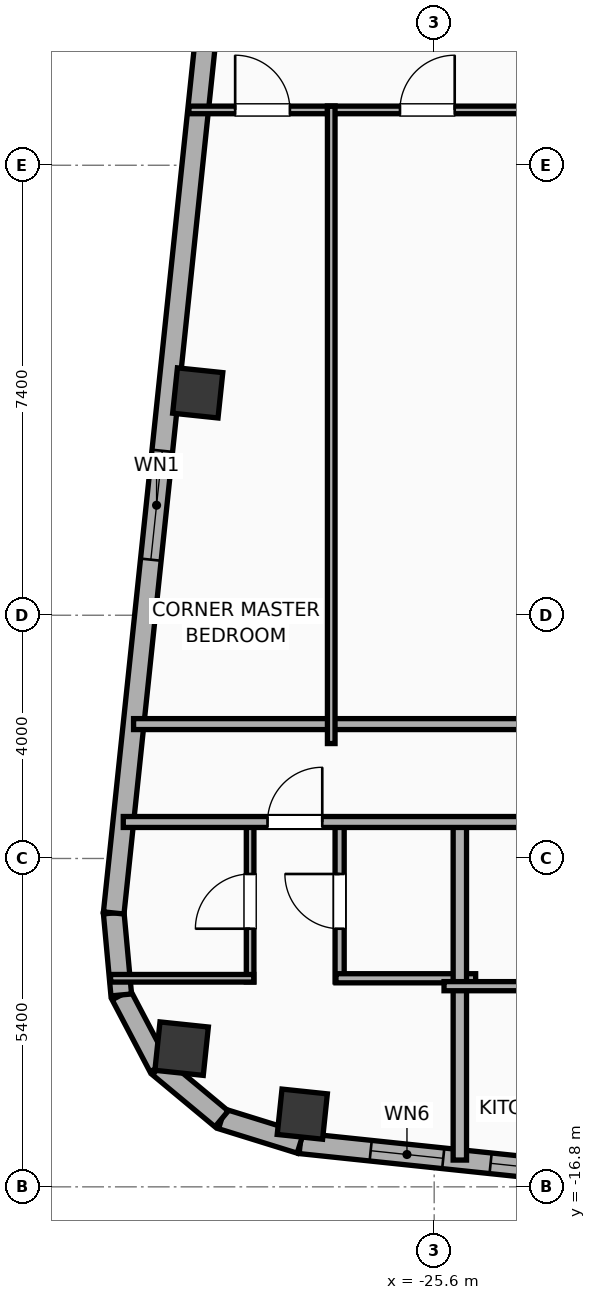
"""IFC4 building model, lengths in metres.
Left out: names, types, materials, properties, quantities, classifications, styles, units other than length and angle.
Written with IfcOpenShell. Run it as: python <this file> out.ifc"""

import sys

from ifc_helpers import new_model, si_unit, direction, frame, frame_2d, origin, origin_2d, place, context, subcontext, project, spatial, rectangle, hollow_rectangle, hollow_circle, extrude, element, fill, save


model = new_model("IFC4")
c1 = context("Model", 3, precision=1e-05, world=origin(), true_north=direction((0.0, 1.0)))
c2 = subcontext(c1, "Body", "Model", "MODEL_VIEW")
j1 = project(units=[si_unit("LENGTHUNIT", "METRE"), si_unit("PLANEANGLEUNIT", "RADIAN")], contexts=[c1])
p1 = place(None, origin())
s1 = spatial("IfcSite", under=j1, at=p1, CompositionType="ELEMENT")
p2 = place(p1, origin())
s2 = spatial("IfcBuilding", under=s1, at=p2, CompositionType="ELEMENT")
p3 = place(p2, frame((0.0, 0.0, 279.5)))
s3 = spatial("IfcBuildingStorey", under=s2, at=p3, CompositionType="ELEMENT", Elevation=279.5)
for number, where, z_axis, x_axis in (
    (1, (-27.769, -15.604, 0.0), (0.0, 0.0, 1.0), (0.995, -0.105, 0.0)),
    (2, (-29.489, -3.744, 0.0), (0.0, 0.0, 1.0), (0.995, -0.105, 0.0)),
):
    element("IfcColumn", number, at=place(p3, frame(where, z_axis=z_axis, x_axis=x_axis)), inside=s3, PredefinedType="COLUMN", context=c2, shape_type="SweptSolid", body=[
        extrude(hollow_rectangle(XDim=0.75, YDim=0.75, WallThickness=0.025, at=origin_2d()), origin(), (0.0, 0.0, 1.0), 3.9),
    ])
p4 = place(p3, frame((-29.753, -14.527, 0.0), z_axis=(0.0, 0.0, 1.0), x_axis=(0.994521895368, -0.104528463268, 0.0)))
e3 = element("IfcColumn", 3, at=p4, inside=s3, PredefinedType="COLUMN", context=c2, shape_type="SweptSolid", body=[
    extrude(hollow_circle(Radius=0.4, WallThickness=0.028, at=origin_2d()), origin(), (0.0, 0.0, 1.0), 3.9),
])
p5 = place(p3, frame((18.708, -20.972, 0.0), z_axis=(0.0, 0.0, 1.0), x_axis=(-0.994521888554, 0.104528528102, 0.0)))
e4 = element("IfcWall", 4, at=p5, inside=s3, PredefinedType="ELEMENTEDWALL", context=c2, shape_type="SweptSolid", body=[
    extrude(rectangle(XDim=46.766, YDim=0.34, at=frame_2d((23.383, 0.0))), origin(), (0.0, 0.0, 1.0), 3.65),
])
p6 = place(p5, frame((23.833, 0.0, 0.75)))
e5 = element("IfcOpeningElement", 5, at=p6, cuts=e4, PredefinedType="OPENING", context=c2, shape_type="SweptSolid", body=[
    extrude(rectangle(XDim=2.4, YDim=2.1, at=frame_2d((1.2, 1.05))), frame((0.0, 0.18, 0.0), z_axis=(0.0, -1.0, 0.0), x_axis=(1.0, 0.0, 0.0)), (0.0, 0.0, 1.0), 0.36),
])
p7 = place(p5, frame((38.622, 0.0, 0.75)))
e6 = element("IfcOpeningElement", 6, at=p7, cuts=e4, PredefinedType="OPENING", context=c2, shape_type="SweptSolid", body=[
    extrude(rectangle(XDim=2.4, YDim=2.1, at=frame_2d((1.2, 1.05))), frame((0.0, 0.18, 0.0), z_axis=(0.0, -1.0, 0.0), x_axis=(1.0, 0.0, 0.0)), (0.0, 0.0, 1.0), 0.36),
])
p8 = place(p5, frame((44.402, 0.0, 0.75)))
e7 = element("IfcOpeningElement", 7, at=p8, cuts=e4, PredefinedType="OPENING", context=c2, shape_type="SweptSolid", body=[
    extrude(rectangle(XDim=1.2, YDim=2.05, at=frame_2d((0.6, 1.025))), frame((0.0, 0.18, 0.0), z_axis=(0.0, -1.0, 0.0), x_axis=(1.0, 0.0, 0.0)), (0.0, 0.0, 1.0), 0.36),
])
p9 = place(p5, frame((42.419, 0.0, 0.75)))
e8 = element("IfcOpeningElement", 8, at=p9, cuts=e4, PredefinedType="OPENING", context=c2, shape_type="SweptSolid", body=[
    extrude(rectangle(XDim=1.2, YDim=2.05, at=frame_2d((0.6, 1.025))), frame((0.0, 0.18, 0.0), z_axis=(0.0, -1.0, 0.0), x_axis=(1.0, 0.0, 0.0)), (0.0, 0.0, 1.0), 0.36),
])
p10 = place(p5, frame((34.933, 0.0, 0.75)))
e9 = element("IfcOpeningElement", 9, at=p10, cuts=e4, PredefinedType="OPENING", context=c2, shape_type="SweptSolid", body=[
    extrude(rectangle(XDim=1.2, YDim=2.05, at=frame_2d((0.6, 1.025))), frame((0.0, 0.18, 0.0), z_axis=(0.0, -1.0, 0.0), x_axis=(1.0, 0.0, 0.0)), (0.0, 0.0, 1.0), 0.36),
])
p11 = place(p5, frame((28.692, 0.0, 0.75)))
e10 = element("IfcOpeningElement", 10, at=p11, cuts=e4, PredefinedType="OPENING", context=c2, shape_type="SweptSolid", body=[
    extrude(rectangle(XDim=1.2, YDim=2.05, at=frame_2d((0.6, 1.025))), frame((0.0, 0.18, 0.0), z_axis=(0.0, -1.0, 0.0), x_axis=(1.0, 0.0, 0.0)), (0.0, 0.0, 1.0), 0.36),
])
p12 = place(p5, frame((30.957, 0.0, 0.75)))
e11 = element("IfcOpeningElement", 11, at=p12, cuts=e4, PredefinedType="OPENING", context=c2, shape_type="SweptSolid", body=[
    extrude(rectangle(XDim=1.2, YDim=2.05, at=frame_2d((0.6, 1.025))), frame((0.0, 0.18, 0.0), z_axis=(0.0, -1.0, 0.0), x_axis=(1.0, 0.0, 0.0)), (0.0, 0.0, 1.0), 0.36),
])
p13 = place(p5, frame((7.51, 0.0, 0.75)))
e12 = element("IfcOpeningElement", 12, at=p13, cuts=e4, PredefinedType="OPENING", context=c2, shape_type="SweptSolid", body=[
    extrude(rectangle(XDim=1.2, YDim=2.05, at=frame_2d((0.6, 1.025))), frame((0.0, 0.18, 0.0), z_axis=(0.0, -1.0, 0.0), x_axis=(1.0, 0.0, 0.0)), (0.0, 0.0, 1.0), 0.36),
])
p14 = place(p5, frame((4.177, 0.0, 0.75)))
e13 = element("IfcOpeningElement", 13, at=p14, cuts=e4, PredefinedType="OPENING", context=c2, shape_type="SweptSolid", body=[
    extrude(rectangle(XDim=1.2, YDim=2.05, at=frame_2d((0.6, 1.025))), frame((0.0, 0.18, 0.0), z_axis=(0.0, -1.0, 0.0), x_axis=(1.0, 0.0, 0.0)), (0.0, 0.0, 1.0), 0.36),
])
p15 = place(p5, frame((1.378, 0.0, 0.75)))
e14 = element("IfcOpeningElement", 14, at=p15, cuts=e4, PredefinedType="OPENING", context=c2, shape_type="SweptSolid", body=[
    extrude(rectangle(XDim=1.2, YDim=2.05, at=frame_2d((0.6, 1.025))), frame((0.0, 0.18, 0.0), z_axis=(0.0, -1.0, 0.0), x_axis=(1.0, 0.0, 0.0)), (0.0, 0.0, 1.0), 0.36),
])
p16 = place(p5, frame((20.254, 0.0, 0.75)))
e15 = element("IfcOpeningElement", 15, at=p16, cuts=e4, PredefinedType="OPENING", context=c2, shape_type="SweptSolid", body=[
    extrude(rectangle(XDim=1.2, YDim=2.05, at=frame_2d((0.6, 1.025))), frame((0.0, 0.18, 0.0), z_axis=(0.0, -1.0, 0.0), x_axis=(1.0, 0.0, 0.0)), (0.0, 0.0, 1.0), 0.36),
])
p17 = place(p5, frame((16.172, 0.0, 0.75)))
e16 = element("IfcOpeningElement", 16, at=p17, cuts=e4, PredefinedType="OPENING", context=c2, shape_type="SweptSolid", body=[
    extrude(rectangle(XDim=1.2, YDim=2.05, at=frame_2d((0.6, 1.025))), frame((0.0, 0.18, 0.0), z_axis=(0.0, -1.0, 0.0), x_axis=(1.0, 0.0, 0.0)), (0.0, 0.0, 1.0), 0.36),
])
p18 = place(p5, frame((12.11, 0.0, 0.75)))
e17 = element("IfcOpeningElement", 17, at=p18, cuts=e4, PredefinedType="OPENING", context=c2, shape_type="SweptSolid", body=[
    extrude(rectangle(XDim=1.2, YDim=2.05, at=frame_2d((0.6, 1.025))), frame((0.0, 0.18, 0.0), z_axis=(0.0, -1.0, 0.0), x_axis=(1.0, 0.0, 0.0)), (0.0, 0.0, 1.0), 0.36),
])
p19 = place(p3, frame((-27.802, -16.084, 0.0), z_axis=(0.0, 0.0, 1.0), x_axis=(-0.955007802701, 0.296580674994, 0.0)))
e18 = element("IfcWall", 18, at=p19, inside=s3, PredefinedType="ELEMENTEDWALL", context=c2, shape_type="SweptSolid", body=[
    extrude(rectangle(XDim=1.354, YDim=0.34, at=frame_2d((0.677, 0.0))), origin(), (0.0, 0.0, 1.0), 3.65),
])
p20 = place(p3, frame((-29.096, -15.682, 0.0), z_axis=(0.0, 0.0, 1.0), x_axis=(-0.768864427906, 0.639411832469, 0.0)))
e19 = element("IfcWall", 19, at=p20, inside=s3, PredefinedType="ELEMENTEDWALL", context=c2, shape_type="SweptSolid", body=[
    extrude(rectangle(XDim=1.337, YDim=0.34, at=frame_2d((0.668, 0.0))), origin(), (0.0, 0.0, 1.0), 3.65),
])
p21 = place(p3, frame((-30.124, -14.827, 0.0), z_axis=(0.0, 0.0, 1.0), x_axis=(-0.465528132217, 0.885033083062, 0.0)))
e20 = element("IfcWall", 20, at=p21, inside=s3, PredefinedType="ELEMENTEDWALL", context=c2, shape_type="SweptSolid", body=[
    extrude(rectangle(XDim=1.337, YDim=0.34, at=frame_2d((0.668, 0.0))), origin(), (0.0, 0.0, 1.0), 3.65),
])
p22 = place(p3, frame((-30.746, -13.644, 0.0), z_axis=(0.0, 0.0, 1.0), x_axis=(-0.091592370975, 0.995796584438, 0.0)))
e21 = element("IfcWall", 21, at=p22, inside=s3, PredefinedType="ELEMENTEDWALL", context=c2, shape_type="SweptSolid", body=[
    extrude(rectangle(XDim=1.354, YDim=0.34, at=frame_2d((0.677, 0.0))), origin(), (0.0, 0.0, 1.0), 3.65),
])
p23 = place(p3, frame((-30.87, -12.296, 0.0), z_axis=(0.0, 0.0, 1.0), x_axis=(0.104533282919, 0.994521388791, 0.0)))
e22 = element("IfcWall", 22, at=p23, inside=s3, PredefinedType="ELEMENTEDWALL", context=c2, shape_type="SweptSolid", body=[
    extrude(rectangle(XDim=30.366, YDim=0.34, at=frame_2d((15.183, 0.0))), origin(), (0.0, 0.0, 1.0), 3.65),
])
p24 = place(p23, frame((5.842, 0.0, 0.75)))
e23 = element("IfcOpeningElement", 23, at=p24, cuts=e22, PredefinedType="OPENING", context=c2, shape_type="SweptSolid", body=[
    extrude(rectangle(XDim=1.8, YDim=2.1, at=frame_2d((0.9, 1.05))), frame((0.0, 0.18, 0.0), z_axis=(0.0, -1.0, 0.0), x_axis=(1.0, 0.0, 0.0)), (0.0, 0.0, 1.0), 0.36),
])
p25 = place(p23, frame((23.525, 0.0, 0.75)))
e24 = element("IfcOpeningElement", 24, at=p25, cuts=e22, PredefinedType="OPENING", context=c2, shape_type="SweptSolid", body=[
    extrude(rectangle(XDim=1.8, YDim=2.1, at=frame_2d((0.9, 1.05))), frame((0.0, 0.18, 0.0), z_axis=(0.0, -1.0, 0.0), x_axis=(1.0, 0.0, 0.0)), (0.0, 0.0, 1.0), 0.36),
])
p26 = place(p23, frame((27.368, 0.0, 0.75)))
e25 = element("IfcOpeningElement", 25, at=p26, cuts=e22, PredefinedType="OPENING", context=c2, shape_type="SweptSolid", body=[
    extrude(rectangle(XDim=1.2, YDim=2.05, at=frame_2d((0.6, 1.025))), frame((0.0, 0.18, 0.0), z_axis=(0.0, -1.0, 0.0), x_axis=(1.0, 0.0, 0.0)), (0.0, 0.0, 1.0), 0.36),
])
p27 = place(p23, frame((16.487, 0.0, 0.75)))
e26 = element("IfcOpeningElement", 26, at=p27, cuts=e22, PredefinedType="OPENING", context=c2, shape_type="SweptSolid", body=[
    extrude(rectangle(XDim=1.2, YDim=2.05, at=frame_2d((0.6, 1.025))), frame((0.0, 0.18, 0.0), z_axis=(0.0, -1.0, 0.0), x_axis=(1.0, 0.0, 0.0)), (0.0, 0.0, 1.0), 0.36),
])
p28 = place(p3, frame((-30.544, -9.19, 0.0), z_axis=(0.0, 0.0, 1.0), x_axis=(1.0, 0.0, 0.0)))
e27 = element("IfcWall", 27, at=p28, inside=s3, PredefinedType="PARTITIONING", context=c2, shape_type="SweptSolid", body=[
    extrude(rectangle(XDim=20.664, YDim=0.18, at=frame_2d((10.332, 0.0))), origin(), (0.0, 0.0, 1.0), 3.65),
])
p29 = place(p3, frame((-28.627, -13.43, 0.0), z_axis=(0.0, 0.0, 1.0), x_axis=(0.0, 1.0, 0.0)))
e28 = element("IfcWall", 28, at=p29, inside=s3, PredefinedType="PARTITIONING", context=c2, shape_type="SweptSolid", body=[
    extrude(rectangle(XDim=2.65, YDim=0.125, at=frame_2d((1.325, 0.0))), origin(), (0.0, 0.0, 1.0), 3.65),
])
p30 = place(p29, frame((0.875, 0.0, 0.0)))
e29 = element("IfcOpeningElement", 29, at=p30, cuts=e28, PredefinedType="OPENING", context=c2, shape_type="SweptSolid", body=[
    extrude(rectangle(XDim=0.9, YDim=2.05, at=frame_2d((0.45, 1.025))), frame((0.0, 0.073, 0.0), z_axis=(0.0, -1.0, 0.0), x_axis=(1.0, 0.0, 0.0)), (0.0, 0.0, 1.0), 0.145),
])
p31 = place(p3, frame((-27.155, -13.43, 0.0), z_axis=(0.0, 0.0, 1.0), x_axis=(0.0, 1.0, 0.0)))
e30 = element("IfcWall", 30, at=p31, inside=s3, PredefinedType="PLUMBINGWALL", context=c2, shape_type="SweptSolid", body=[
    extrude(rectangle(XDim=2.65, YDim=0.15, at=frame_2d((1.325, 0.0))), origin(), (0.0, 0.0, 1.0), 3.65),
])
p32 = place(p31, frame((0.875, 0.0, 0.0)))
e31 = element("IfcOpeningElement", 31, at=p32, cuts=e30, PredefinedType="OPENING", context=c2, shape_type="SweptSolid", body=[
    extrude(rectangle(XDim=0.9, YDim=2.05, at=frame_2d((0.45, 1.025))), frame((0.0, 0.085, 0.0), z_axis=(0.0, -1.0, 0.0), x_axis=(1.0, 0.0, 0.0)), (0.0, 0.0, 1.0), 0.17),
])
p33 = place(p3, frame((-30.922, -13.37, 0.0), z_axis=(0.0, 0.0, 1.0), x_axis=(1.0, 0.0, 0.0)))
e32 = element("IfcWall", 32, at=p33, inside=s3, PredefinedType="PARTITIONING", context=c2, shape_type="SweptSolid", body=[
    extrude(rectangle(XDim=2.355, YDim=0.125, at=frame_2d((1.178, 0.0))), origin(), (0.0, 0.0, 1.0), 3.65),
])
p34 = place(p3, frame((-27.215, -13.37, 0.0), z_axis=(0.0, 0.0, 1.0), x_axis=(1.0, 0.0, 0.0)))
e33 = element("IfcWall", 33, at=p34, inside=s3, PredefinedType="PLUMBINGWALL", context=c2, shape_type="SweptSolid", body=[
    extrude(rectangle(XDim=2.297, YDim=0.15, at=frame_2d((1.148, 0.0))), origin(), (0.0, 0.0, 1.0), 3.65),
])
p35 = place(p3, frame((-25.178, -16.36, 0.0), z_axis=(0.0, 0.0, 1.0), x_axis=(0.0, 1.0, 0.0)))
e34 = element("IfcWall", 34, at=p35, inside=s3, PredefinedType="PARTITIONING", context=c2, shape_type="SweptSolid", body=[
    extrude(rectangle(XDim=5.64, YDim=0.22, at=frame_2d((2.82, 0.0))), origin(), (0.0, 0.0, 1.0), 3.65),
])
p36 = place(p3, frame((-25.438, -13.5, 0.0), z_axis=(0.0, 0.0, 1.0), x_axis=(1.0, 0.0, 0.0)))
e35 = element("IfcWall", 35, at=p36, inside=s3, PredefinedType="PLUMBINGWALL", context=c2, shape_type="SweptSolid", body=[
    extrude(rectangle(XDim=2.55, YDim=0.15, at=frame_2d((1.275, 0.0))), origin(), (0.0, 0.0, 1.0), 3.65),
])
p37 = place(p3, frame((-30.713, -10.8, 0.0), z_axis=(0.0, 0.0, 1.0), x_axis=(1.0, 0.0, 0.0)))
e36 = element("IfcWall", 36, at=p37, inside=s3, PredefinedType="PARTITIONING", context=c2, shape_type="SweptSolid", body=[
    extrude(rectangle(XDim=22.633, YDim=0.18, at=frame_2d((11.316, 0.0))), origin(), (0.0, 0.0, 1.0), 3.65),
])
p38 = place(p37, frame((2.372, 0.0, 0.0)))
e37 = element("IfcOpeningElement", 37, at=p38, cuts=e36, PredefinedType="OPENING", context=c2, shape_type="SweptSolid", body=[
    extrude(rectangle(XDim=0.9, YDim=2.05, at=frame_2d((0.45, 1.025))), frame((0.0, 0.1, 0.0), z_axis=(0.0, -1.0, 0.0), x_axis=(1.0, 0.0, 0.0)), (0.0, 0.0, 1.0), 0.2),
])
p39 = place(p37, frame((8.885, 0.0, 0.0)))
e38 = element("IfcOpeningElement", 38, at=p39, cuts=e36, PredefinedType="OPENING", context=c2, shape_type="SweptSolid", body=[
    extrude(rectangle(XDim=1.15, YDim=2.05, at=frame_2d((0.575, 1.025))), frame((0.0, 0.1, 0.0), z_axis=(0.0, -1.0, 0.0), x_axis=(1.0, 0.0, 0.0)), (0.0, 0.0, 1.0), 0.2),
])
p40 = place(p37, frame((13.811, 0.0, 0.0)))
e39 = element("IfcOpeningElement", 39, at=p40, cuts=e36, PredefinedType="OPENING", context=c2, shape_type="SweptSolid", body=[
    extrude(rectangle(XDim=0.9, YDim=2.05, at=frame_2d((0.45, 1.025))), frame((0.0, 0.1, 0.0), z_axis=(0.0, -1.0, 0.0), x_axis=(1.0, 0.0, 0.0)), (0.0, 0.0, 1.0), 0.2),
])
p41 = place(p37, frame((20.283, 0.0, 0.0)))
e40 = element("IfcOpeningElement", 40, at=p41, cuts=e36, PredefinedType="OPENING", context=c2, shape_type="SweptSolid", body=[
    extrude(rectangle(XDim=1.15, YDim=2.05, at=frame_2d((0.575, 1.025))), frame((0.0, 0.1, 0.0), z_axis=(0.0, -1.0, 0.0), x_axis=(1.0, 0.0, 0.0)), (0.0, 0.0, 1.0), 0.2),
])
p42 = place(p3, frame((-29.633, 0.91, 0.0), z_axis=(0.0, 0.0, 1.0), x_axis=(1.0, 0.0, 0.0)))
e41 = element("IfcWall", 41, at=p42, inside=s3, PredefinedType="PARTITIONING", context=c2, shape_type="SweptSolid", body=[
    extrude(rectangle(XDim=2.403, YDim=0.125, at=frame_2d((1.201, 0.0))), origin(), (0.0, 0.0, 1.0), 3.65),
])
p43 = place(p42, frame((0.76, 0.0, 0.0)))
e42 = element("IfcOpeningElement", 42, at=p43, cuts=e41, PredefinedType="OPENING", context=c2, shape_type="SweptSolid", body=[
    extrude(rectangle(XDim=0.9, YDim=2.05, at=frame_2d((0.45, 1.025))), frame((0.0, 0.073, 0.0), z_axis=(0.0, -1.0, 0.0), x_axis=(1.0, 0.0, 0.0)), (0.0, 0.0, 1.0), 0.145),
])
p44 = place(p3, frame((-27.355, 0.91, 0.0), z_axis=(0.0, 0.0, 1.0), x_axis=(1.0, 0.0, 0.0)))
e43 = element("IfcWall", 43, at=p44, inside=s3, PredefinedType="PARTITIONING", context=c2, shape_type="SweptSolid", body=[
    extrude(rectangle(XDim=3.286, YDim=0.125, at=frame_2d((1.643, 0.0))), origin(), (0.0, 0.0, 1.0), 3.65),
])
p45 = place(p44, frame((1.193, 0.0, 0.0)))
e44 = element("IfcOpeningElement", 44, at=p45, cuts=e43, PredefinedType="OPENING", context=c2, shape_type="SweptSolid", body=[
    extrude(rectangle(XDim=0.9, YDim=2.05, at=frame_2d((0.45, 1.025))), frame((0.0, 0.073, 0.0), z_axis=(0.0, -1.0, 0.0), x_axis=(1.0, 0.0, 0.0)), (0.0, 0.0, 1.0), 0.145),
])
p46 = place(p3, frame((-27.293, -9.51, 0.0), z_axis=(0.0, 0.0, 1.0), x_axis=(0.0, 1.0, 0.0)))
e45 = element("IfcWall", 45, at=p46, inside=s3, PredefinedType="PARTITIONING", context=c2, shape_type="SweptSolid", body=[
    extrude(rectangle(XDim=10.48, YDim=0.125, at=frame_2d((5.24, 0.0))), origin(), (0.0, 0.0, 1.0), 3.65),
])
p47 = place(p24, origin())
e46 = element("IfcWindow", 46, at=p47, inside=s3, PartitioningType="SINGLE_PANEL", PredefinedType="WINDOW", context=c2, shape_type="SweptSolid", body=[
    extrude(rectangle(XDim=1.8, YDim=2.1, at=frame_2d((0.9, 1.05))), frame((0.0, 0.03, 0.0), z_axis=(0.0, -1.0, 0.0), x_axis=(1.0, 0.0, 0.0)), (0.0, 0.0, 1.0), 0.06),
])
fill(e23, e46)
p48 = place(p8, origin())
e47 = element("IfcWindow", 47, at=p48, inside=s3, PartitioningType="SINGLE_PANEL", PredefinedType="WINDOW", context=c2, shape_type="SweptSolid", body=[
    extrude(rectangle(XDim=1.2, YDim=2.05, at=frame_2d((0.6, 1.025))), frame((0.0, 0.03, 0.0), z_axis=(0.0, -1.0, 0.0), x_axis=(1.0, 0.0, 0.0)), (0.0, 0.0, 1.0), 0.06),
])
fill(e7, e47)
p49 = place(p9, origin())
e48 = element("IfcWindow", 48, at=p49, inside=s3, PartitioningType="SINGLE_PANEL", PredefinedType="WINDOW", context=c2, shape_type="SweptSolid", body=[
    extrude(rectangle(XDim=1.2, YDim=2.05, at=frame_2d((0.6, 1.025))), frame((0.0, 0.03, 0.0), z_axis=(0.0, -1.0, 0.0), x_axis=(1.0, 0.0, 0.0)), (0.0, 0.0, 1.0), 0.06),
])
fill(e8, e48)
p50 = place(p30, origin())
e49 = element("IfcDoor", 49, at=p50, inside=s3, OperationType="SINGLE_SWING_LEFT", PredefinedType="DOOR", context=c2, shape_type="SweptSolid", body=[
    extrude(rectangle(XDim=0.9, YDim=2.05, at=frame_2d((0.45, 1.025))), frame((0.0, 0.025, 0.0), z_axis=(0.0, -1.0, 0.0), x_axis=(1.0, 0.0, 0.0)), (0.0, 0.0, 1.0), 0.05),
])
fill(e29, e49)
p51 = place(p32, origin())
e50 = element("IfcDoor", 50, at=p51, inside=s3, OperationType="SINGLE_SWING_RIGHT", PredefinedType="DOOR", context=c2, shape_type="SweptSolid", body=[
    extrude(rectangle(XDim=0.9, YDim=2.05, at=frame_2d((0.45, 1.025))), frame((0.0, 0.025, 0.0), z_axis=(0.0, -1.0, 0.0), x_axis=(1.0, 0.0, 0.0)), (0.0, 0.0, 1.0), 0.05),
])
fill(e31, e50)
p52 = place(p38, origin())
e51 = element("IfcDoor", 51, at=p52, inside=s3, OperationType="SINGLE_SWING_RIGHT", PredefinedType="DOOR", context=c2, shape_type="SweptSolid", body=[
    extrude(rectangle(XDim=0.9, YDim=2.05, at=frame_2d((0.45, 1.025))), frame((0.0, 0.025, 0.0), z_axis=(0.0, -1.0, 0.0), x_axis=(1.0, 0.0, 0.0)), (0.0, 0.0, 1.0), 0.05),
])
fill(e37, e51)
p53 = place(p43, origin())
e52 = element("IfcDoor", 52, at=p53, inside=s3, OperationType="SINGLE_SWING_LEFT", PredefinedType="DOOR", context=c2, shape_type="SweptSolid", body=[
    extrude(rectangle(XDim=0.9, YDim=2.05, at=frame_2d((0.45, 1.025))), frame((0.0, 0.025, 0.0), z_axis=(0.0, -1.0, 0.0), x_axis=(1.0, 0.0, 0.0)), (0.0, 0.0, 1.0), 0.05),
])
fill(e42, e52)
p54 = place(p45, origin())
e53 = element("IfcDoor", 53, at=p54, inside=s3, OperationType="SINGLE_SWING_RIGHT", PredefinedType="DOOR", context=c2, shape_type="SweptSolid", body=[
    extrude(rectangle(XDim=0.9, YDim=2.05, at=frame_2d((0.45, 1.025))), frame((0.0, 0.025, 0.0), z_axis=(0.0, -1.0, 0.0), x_axis=(1.0, 0.0, 0.0)), (0.0, 0.0, 1.0), 0.05),
])
fill(e44, e53)
save(model, sys.argv[1])
